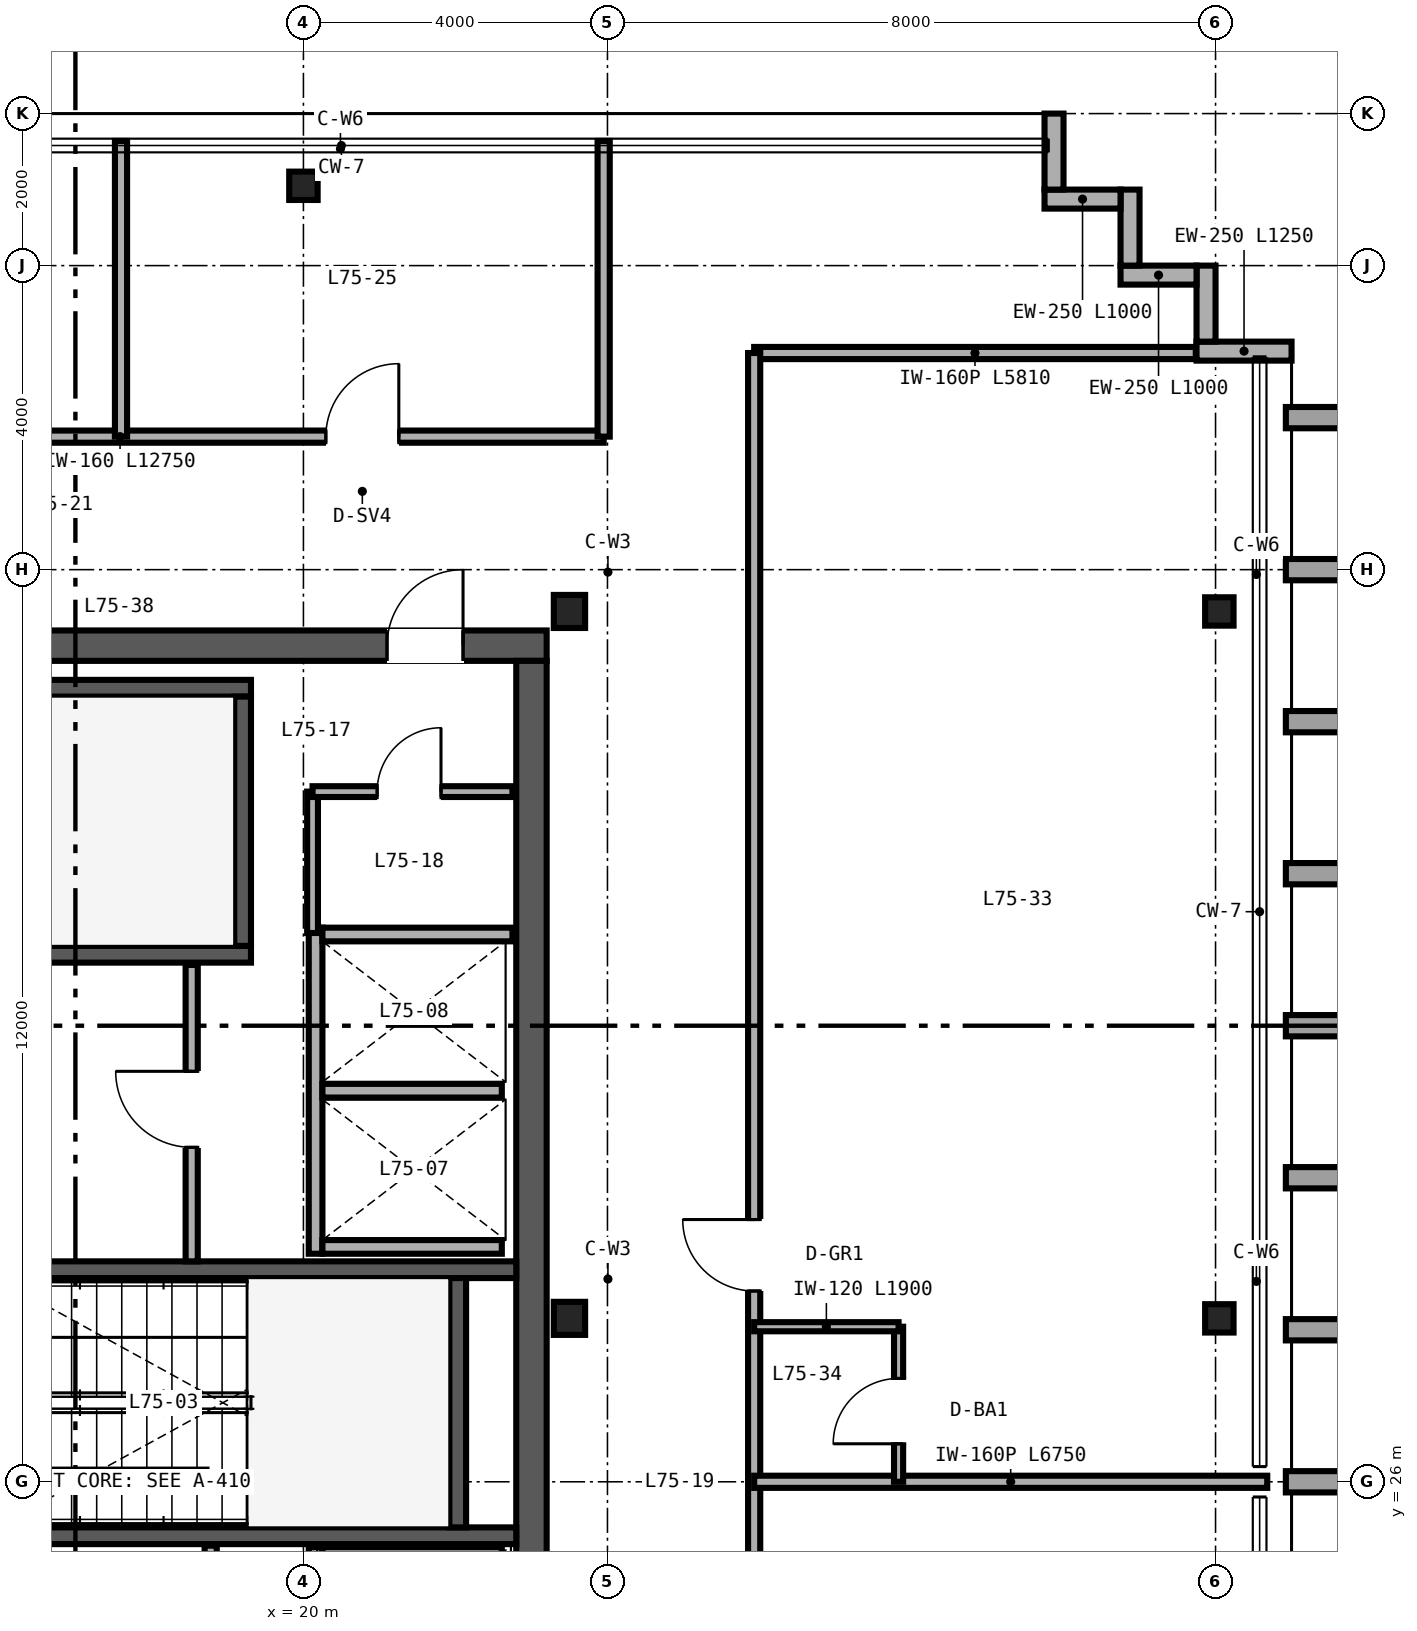
"""IFC4 building model, lengths in metres.
Left out: names, types, materials, properties, quantities, classifications, styles, units other than length and angle.
Written with IfcOpenShell. Run it as: python <this file> out.ifc"""

import sys

from ifc_helpers import new_model, si_unit, direction, frame, frame_2d, origin, origin_2d, place, context, subcontext, project, spatial, rectangle, i_section, extrude, source, transform, mapped, element, fill, save


model = new_model("IFC4")
c1 = context("Model", 3, precision=1e-05, world=origin(), true_north=direction((0.0, 1.0)))
c2 = subcontext(c1, "Body", "Model", "MODEL_VIEW")
j1 = project(units=[si_unit("LENGTHUNIT", "METRE"), si_unit("PLANEANGLEUNIT", "RADIAN")], contexts=[c1])
p1 = place(None, origin())
s1 = spatial("IfcSite", under=j1, at=p1, CompositionType="ELEMENT")
p2 = place(p1, origin())
s2 = spatial("IfcBuilding", under=s1, at=p2, CompositionType="ELEMENT")
p3 = place(p2, frame((0.0, 0.0, 294.0)))
s3 = spatial("IfcBuildingStorey", under=s2, at=p3, CompositionType="ELEMENT", Elevation=294.0)
p4 = place(p3, frame((10.8, 37.0, 0.0), z_axis=(0.0, 0.0, 1.0), x_axis=(1.0, 0.0, 0.0)))
e1 = element("IfcWall", 1, at=p4, inside=s3, PredefinedType="SHEAR", context=c2, shape_type="SweptSolid", body=[
    extrude(rectangle(XDim=12.4, YDim=0.4, at=frame_2d((6.2, 0.0))), origin(), (0.0, 0.0, 1.0), 3.38),
])
p5 = place(p4, frame((10.3, 0.0, 0.0)))
e2 = element("IfcOpeningElement", 2, at=p5, cuts=e1, PredefinedType="OPENING", context=c2, shape_type="SweptSolid", body=[
    extrude(rectangle(XDim=1.0, YDim=2.15, at=frame_2d((0.5, 1.075))), frame((0.0, 0.21, 0.0), z_axis=(0.0, -1.0, 0.0), x_axis=(1.0, 0.0, 0.0)), (0.0, 0.0, 1.0), 0.42),
])
p6 = place(p3, frame((23.0, 15.2, 0.0), z_axis=(0.0, 0.0, 1.0), x_axis=(0.0, 1.0, 0.0)))
e3 = element("IfcWall", 3, at=p6, inside=s3, PredefinedType="SHEAR", context=c2, shape_type="SweptSolid", body=[
    extrude(rectangle(XDim=21.6, YDim=0.4, at=frame_2d((10.8, 0.0))), origin(), (0.0, 0.0, 1.0), 3.38),
])
p7 = place(p3, frame((11.2, 32.94, 0.0), z_axis=(0.0, 0.0, 1.0), x_axis=(1.0, 0.0, 0.0)))
e4 = element("IfcWall", 4, at=p7, inside=s3, PredefinedType="SHEAR", context=c2, shape_type="SweptSolid", body=[
    extrude(rectangle(XDim=8.11, YDim=0.22, at=frame_2d((4.055, 0.0))), origin(), (0.0, 0.0, 1.0), 3.4),
])
p8 = place(p7, frame((0.72, 0.0, 0.0)))
e5 = element("IfcOpeningElement", 5, at=p8, cuts=e4, PredefinedType="OPENING", context=c2, shape_type="SweptSolid", body=[
    extrude(rectangle(XDim=1.05, YDim=2.15, at=frame_2d((0.525, 1.075))), frame((0.0, 0.12, 0.0), z_axis=(0.0, -1.0, 0.0), x_axis=(1.0, 0.0, 0.0)), (0.0, 0.0, 1.0), 0.24),
])
p9 = place(p3, frame((11.2, 36.44, 0.0), z_axis=(0.0, 0.0, 1.0), x_axis=(1.0, 0.0, 0.0)))
e6 = element("IfcWall", 6, at=p9, inside=s3, PredefinedType="SHEAR", context=c2, shape_type="SweptSolid", body=[
    extrude(rectangle(XDim=8.11, YDim=0.22, at=frame_2d((4.055, 0.0))), origin(), (0.0, 0.0, 1.0), 3.4),
])
p10 = place(p3, frame((19.2, 33.05, 0.0), z_axis=(0.0, 0.0, 1.0), x_axis=(0.0, 1.0, 0.0)))
e7 = element("IfcWall", 7, at=p10, inside=s3, PredefinedType="SHEAR", context=c2, shape_type="SweptSolid", body=[
    extrude(rectangle(XDim=3.28, YDim=0.22, at=frame_2d((1.64, 0.0))), origin(), (0.0, 0.0, 1.0), 3.4),
])
p11 = place(p3, frame((14.18, 25.29, 0.0), z_axis=(0.0, 0.0, 1.0), x_axis=(1.0, 0.0, 0.0)))
e8 = element("IfcWall", 8, at=p11, inside=s3, PredefinedType="SHEAR", context=c2, shape_type="SweptSolid", body=[
    extrude(rectangle(XDim=8.62, YDim=0.22, at=frame_2d((4.31, 0.0))), origin(), (0.0, 0.0, 1.0), 3.4),
])
p12 = place(p11, frame((0.47, 0.0, 0.0)))
e9 = element("IfcOpeningElement", 9, at=p12, cuts=e8, PredefinedType="OPENING", context=c2, shape_type="SweptSolid", body=[
    extrude(rectangle(XDim=1.05, YDim=2.15, at=frame_2d((0.525, 1.075))), frame((0.0, 0.12, 0.0), z_axis=(0.0, -1.0, 0.0), x_axis=(1.0, 0.0, 0.0)), (0.0, 0.0, 1.0), 0.24),
])
p13 = place(p3, frame((14.18, 28.79, 0.0), z_axis=(0.0, 0.0, 1.0), x_axis=(1.0, 0.0, 0.0)))
e10 = element("IfcWall", 10, at=p13, inside=s3, PredefinedType="SHEAR", context=c2, shape_type="SweptSolid", body=[
    extrude(rectangle(XDim=8.62, YDim=0.22, at=frame_2d((4.31, 0.0))), origin(), (0.0, 0.0, 1.0), 3.4),
])
p14 = place(p3, frame((22.03, 25.4, 0.0), z_axis=(0.0, 0.0, 1.0), x_axis=(0.0, 1.0, 0.0)))
e11 = element("IfcWall", 11, at=p14, inside=s3, PredefinedType="SHEAR", context=c2, shape_type="SweptSolid", body=[
    extrude(rectangle(XDim=3.28, YDim=0.22, at=frame_2d((1.64, 0.0))), origin(), (0.0, 0.0, 1.0), 3.4),
])
m1 = source(origin(), c2, "Body", "SweptSolid", [
    extrude(i_section(OverallWidth=0.412, OverallDepth=0.435, WebThickness=0.036, FlangeThickness=0.057, FilletRadius=0.025, at=origin_2d()), origin(), (0.0, 0.0, 1.0), 3.38),
])
for number, where, z_axis, x_axis in (
    (12, (23.5, 28.15, 0.0), (0.0, 0.0, 1.0), (1.0, 0.0, 0.0)),
    (13, (23.5, 37.45, 0.0), (0.0, 0.0, 1.0), (1.0, 0.0, 0.0)),
):
    element("IfcColumn", number, at=place(p3, frame(where, z_axis=z_axis, x_axis=x_axis)), inside=s3, PredefinedType="COLUMN", context=c2, shape_type="MappedRepresentation", body=[
        mapped(m1, transform((0.0, 0.0, 0.0), scale=1.0)),
    ])
m2 = source(origin(), c2, "Body", "SweptSolid", [
    extrude(i_section(OverallWidth=0.374, OverallDepth=0.373, WebThickness=0.016, FlangeThickness=0.026, FilletRadius=0.025, at=origin_2d()), origin(), (0.0, 0.0, 1.0), 3.38),
])
for number, where, z_axis, x_axis in (
    (14, (20.0, 43.05, 0.0), (0.0, 0.0, 1.0), (1.0, 0.0, 0.0)),
    (15, (32.05, 28.15, 0.0), (0.0, 0.0, 1.0), (1.0, 0.0, 0.0)),
    (16, (32.05, 37.45, 0.0), (0.0, 0.0, 1.0), (1.0, 0.0, 0.0)),
):
    element("IfcColumn", number, at=place(p3, frame(where, z_axis=z_axis, x_axis=x_axis)), inside=s3, PredefinedType="COLUMN", context=c2, shape_type="MappedRepresentation", body=[
        mapped(m2, transform((0.0, 0.0, 0.0), scale=1.0)),
    ])
p15 = place(p3, frame((33.0, 40.875, 0.0), z_axis=(0.0, 0.0, 1.0), x_axis=(-1.0, 0.0, 0.0)))
e17 = element("IfcWall", 17, at=p15, inside=s3, PredefinedType="SOLIDWALL", context=c2, shape_type="SweptSolid", body=[
    extrude(rectangle(XDim=1.25, YDim=0.25, at=frame_2d((0.625, 0.0))), origin(), (0.0, 0.0, 1.0), 3.38),
])
for number, where, z_axis, x_axis in (
    (18, (31.875, 41.0, 0.0), (0.0, 0.0, 1.0), (0.0, 1.0, 0.0)),
    (19, (31.75, 41.875, 0.0), (0.0, 0.0, 1.0), (-1.0, 0.0, 0.0)),
    (20, (30.875, 42.0, 0.0), (0.0, 0.0, 1.0), (0.0, 1.0, 0.0)),
    (21, (30.75, 42.875, 0.0), (0.0, 0.0, 1.0), (-1.0, 0.0, 0.0)),
    (22, (29.875, 43.0, 0.0), (0.0, 0.0, 1.0), (0.0, 1.0, 0.0)),
):
    element("IfcWall", number, at=place(p3, frame(where, z_axis=z_axis, x_axis=x_axis)), inside=s3, PredefinedType="SOLIDWALL", context=c2, shape_type="SweptSolid", body=[
        extrude(rectangle(XDim=1.0, YDim=0.25, at=frame_2d((0.5, 0.0))), origin(), (0.0, 0.0, 1.0), 3.38),
    ])
p16 = place(p3, frame((20.16, 18.82, 0.0), z_axis=(0.0, 0.0, 1.0), x_axis=(0.0, 1.0, 0.0)))
e23 = element("IfcWall", 23, at=p16, inside=s3, PredefinedType="SOLIDWALL", context=c2, shape_type="SweptSolid", body=[
    extrude(rectangle(XDim=6.32, YDim=0.18, at=frame_2d((3.16, 0.0))), origin(), (0.0, 0.0, 1.0), 2.48),
])
p17 = place(p16, frame((0.555, 0.0, 0.0)))
e24 = element("IfcOpeningElement", 24, at=p17, cuts=e23, PredefinedType="OPENING", context=c2, shape_type="SweptSolid", body=[
    extrude(rectangle(XDim=1.1, YDim=2.2, at=frame_2d((0.55, 1.1))), frame((0.0, 0.1, 0.0), z_axis=(0.0, -1.0, 0.0), x_axis=(1.0, 0.0, 0.0)), (0.0, 0.0, 1.0), 0.2),
])
p18 = place(p16, frame((2.635, 0.0, 0.0)))
e25 = element("IfcOpeningElement", 25, at=p18, cuts=e23, PredefinedType="OPENING", context=c2, shape_type="SweptSolid", body=[
    extrude(rectangle(XDim=1.1, YDim=2.2, at=frame_2d((0.55, 1.1))), frame((0.0, 0.1, 0.0), z_axis=(0.0, -1.0, 0.0), x_axis=(1.0, 0.0, 0.0)), (0.0, 0.0, 1.0), 0.2),
])
p19 = place(p16, frame((4.69, 0.0, 0.0)))
e26 = element("IfcOpeningElement", 26, at=p19, cuts=e23, PredefinedType="OPENING", context=c2, shape_type="SweptSolid", body=[
    extrude(rectangle(XDim=1.1, YDim=2.2, at=frame_2d((0.55, 1.1))), frame((0.0, 0.1, 0.0), z_axis=(0.0, -1.0, 0.0), x_axis=(1.0, 0.0, 0.0)), (0.0, 0.0, 1.0), 0.2),
])
p20 = place(p3, frame((20.25, 25.05, 0.0), z_axis=(0.0, 0.0, 1.0), x_axis=(1.0, 0.0, 0.0)))
e27 = element("IfcWall", 27, at=p20, inside=s3, PredefinedType="SOLIDWALL", context=c2, shape_type="SweptSolid", body=[
    extrude(rectangle(XDim=2.36, YDim=0.18, at=frame_2d((1.18, 0.0))), origin(), (0.0, 0.0, 1.0), 3.38),
])
p21 = place(p3, frame((20.16, 29.0, 0.0), z_axis=(0.0, 0.0, 1.0), x_axis=(0.0, 1.0, 0.0)))
e28 = element("IfcWall", 28, at=p21, inside=s3, PredefinedType="SOLIDWALL", context=c2, shape_type="SweptSolid", body=[
    extrude(rectangle(XDim=4.29, YDim=0.18, at=frame_2d((2.145, 0.0))), origin(), (0.0, 0.0, 1.0), 3.38),
])
p22 = place(p3, frame((20.25, 29.09, 0.0), z_axis=(0.0, 0.0, 1.0), x_axis=(1.0, 0.0, 0.0)))
e29 = element("IfcWall", 29, at=p22, inside=s3, PredefinedType="SOLIDWALL", context=c2, shape_type="SweptSolid", body=[
    extrude(rectangle(XDim=2.36, YDim=0.18, at=frame_2d((1.18, 0.0))), origin(), (0.0, 0.0, 1.0), 3.38),
])
p23 = place(p3, frame((20.25, 33.2, 0.0), z_axis=(0.0, 0.0, 1.0), x_axis=(1.0, 0.0, 0.0)))
e30 = element("IfcWall", 30, at=p23, inside=s3, PredefinedType="SOLIDWALL", context=c2, shape_type="SweptSolid", body=[
    extrude(rectangle(XDim=2.5, YDim=0.18, at=frame_2d((1.25, 0.0))), origin(), (0.0, 0.0, 1.0), 3.38),
])
p24 = place(p3, frame((20.25, 31.145, 0.0), z_axis=(0.0, 0.0, 1.0), x_axis=(1.0, 0.0, 0.0)))
e31 = element("IfcWall", 31, at=p24, inside=s3, PredefinedType="SOLIDWALL", context=c2, shape_type="SweptSolid", body=[
    extrude(rectangle(XDim=2.36, YDim=0.18, at=frame_2d((1.18, 0.0))), origin(), (0.0, 0.0, 1.0), 3.38),
])
p25 = place(p3, frame((18.78, 21.35, 0.0), z_axis=(0.0, 0.0, 1.0), x_axis=(0.0, 1.0, 0.0)))
e32 = element("IfcWall", 32, at=p25, inside=s3, PredefinedType="PARTITIONING", context=c2, shape_type="SweptSolid", body=[
    extrude(rectangle(XDim=3.81, YDim=0.16, at=frame_2d((1.905, 0.0))), origin(), (0.0, 0.0, 1.0), 3.38),
])
p26 = place(p3, frame((18.53, 28.9, 0.0), z_axis=(0.0, 0.0, 1.0), x_axis=(0.0, 1.0, 0.0)))
e33 = element("IfcWall", 33, at=p26, inside=s3, PredefinedType="PARTITIONING", context=c2, shape_type="SweptSolid", body=[
    extrude(rectangle(XDim=3.9, YDim=0.16, at=frame_2d((1.95, 0.0))), origin(), (0.0, 0.0, 1.0), 3.38),
])
p27 = place(p26, frame((1.5, 0.0, 0.0)))
e34 = element("IfcOpeningElement", 34, at=p27, cuts=e33, PredefinedType="OPENING", context=c2, shape_type="SweptSolid", body=[
    extrude(rectangle(XDim=1.0, YDim=2.15, at=frame_2d((0.5, 1.075))), frame((0.0, 0.09, 0.0), z_axis=(0.0, -1.0, 0.0), x_axis=(1.0, 0.0, 0.0)), (0.0, 0.0, 1.0), 0.18),
])
p28 = place(p3, frame((20.12, 33.22, 0.0), z_axis=(0.0, 0.0, 1.0), x_axis=(0.0, 1.0, 0.0)))
e35 = element("IfcWall", 35, at=p28, inside=s3, PredefinedType="PARTITIONING", context=c2, shape_type="SweptSolid", body=[
    extrude(rectangle(XDim=1.86, YDim=0.142, at=frame_2d((0.93, 0.0))), origin(), (0.0, 0.0, 1.0), 3.38),
])
p29 = place(p3, frame((20.12, 35.08, 0.0), z_axis=(0.0, 0.0, 1.0), x_axis=(1.0, 0.0, 0.0)))
e36 = element("IfcWall", 36, at=p29, inside=s3, PredefinedType="PARTITIONING", context=c2, shape_type="SweptSolid", body=[
    extrude(rectangle(XDim=2.63, YDim=0.142, at=frame_2d((1.315, 0.0))), origin(), (0.0, 0.0, 1.0), 3.38),
])
p30 = place(p29, frame((0.85, 0.0, 0.0)))
e37 = element("IfcOpeningElement", 37, at=p30, cuts=e36, PredefinedType="OPENING", context=c2, shape_type="SweptSolid", body=[
    extrude(rectangle(XDim=0.84, YDim=2.1, at=frame_2d((0.42, 1.05))), frame((0.0, 0.081, 0.0), z_axis=(0.0, -1.0, 0.0), x_axis=(1.0, 0.0, 0.0)), (0.0, 0.0, 1.0), 0.162),
])
p31 = place(p3, frame((11.2, 39.75, 0.0), z_axis=(0.0, 0.0, 1.0), x_axis=(1.0, 0.0, 0.0)))
e38 = element("IfcWall", 38, at=p31, inside=s3, PredefinedType="PARTITIONING", context=c2, shape_type="SweptSolid", body=[
    extrude(rectangle(XDim=12.75, YDim=0.16, at=frame_2d((6.375, 0.0))), origin(), (0.0, 0.0, 1.0), 3.38),
])
p32 = place(p31, frame((2.72, 0.0, 0.0)))
e39 = element("IfcOpeningElement", 39, at=p32, cuts=e38, PredefinedType="OPENING", context=c2, shape_type="SweptSolid", body=[
    extrude(rectangle(XDim=0.96, YDim=2.15, at=frame_2d((0.48, 1.075))), frame((0.0, 0.09, 0.0), z_axis=(0.0, -1.0, 0.0), x_axis=(1.0, 0.0, 0.0)), (0.0, 0.0, 1.0), 0.18),
])
p33 = place(p31, frame((9.095, 0.0, 0.0)))
e40 = element("IfcOpeningElement", 40, at=p33, cuts=e38, PredefinedType="OPENING", context=c2, shape_type="SweptSolid", body=[
    extrude(rectangle(XDim=0.96, YDim=2.15, at=frame_2d((0.48, 1.075))), frame((0.0, 0.09, 0.0), z_axis=(0.0, -1.0, 0.0), x_axis=(1.0, 0.0, 0.0)), (0.0, 0.0, 1.0), 0.18),
])
p34 = place(p3, frame((23.95, 39.75, 0.0), z_axis=(0.0, 0.0, 1.0), x_axis=(0.0, 1.0, 0.0)))
e41 = element("IfcWall", 41, at=p34, inside=s3, PredefinedType="PARTITIONING", context=c2, shape_type="SweptSolid", body=[
    extrude(rectangle(XDim=3.89, YDim=0.16, at=frame_2d((1.945, 0.0))), origin(), (0.0, 0.0, 1.0), 3.38),
])
p35 = place(p3, frame((17.6, 39.75, 0.0), z_axis=(0.0, 0.0, 1.0), x_axis=(0.0, 1.0, 0.0)))
e42 = element("IfcWall", 42, at=p35, inside=s3, PredefinedType="PARTITIONING", context=c2, shape_type="SweptSolid", body=[
    extrude(rectangle(XDim=3.89, YDim=0.16, at=frame_2d((1.945, 0.0))), origin(), (0.0, 0.0, 1.0), 2.687),
])
p36 = place(p3, frame((25.93, 40.85, 0.0), z_axis=(0.0, 0.0, 1.0), x_axis=(1.0, 0.0, 0.0)))
e43 = element("IfcWall", 43, at=p36, inside=s3, PredefinedType="PARTITIONING", context=c2, shape_type="SweptSolid", body=[
    extrude(rectangle(XDim=5.81, YDim=0.16, at=frame_2d((2.905, 0.0))), origin(), (0.0, 0.0, 1.0), 3.38),
])
p37 = place(p3, frame((25.93, 11.15, 0.0), z_axis=(0.0, 0.0, 1.0), x_axis=(0.0, 1.0, 0.0)))
e44 = element("IfcWall", 44, at=p37, inside=s3, PredefinedType="PARTITIONING", context=c2, shape_type="SweptSolid", body=[
    extrude(rectangle(XDim=29.7, YDim=0.16, at=frame_2d((14.85, 0.0))), origin(), (0.0, 0.0, 1.0), 2.524),
])
p38 = place(p37, frame((2.51, 0.0, 0.0)))
e45 = element("IfcOpeningElement", 45, at=p38, cuts=e44, PredefinedType="OPENING", context=c2, shape_type="SweptSolid", body=[
    extrude(rectangle(XDim=0.94, YDim=2.15, at=frame_2d((0.47, 1.075))), frame((0.0, 0.09, 0.0), z_axis=(0.0, -1.0, 0.0), x_axis=(1.0, 0.0, 0.0)), (0.0, 0.0, 1.0), 0.18),
])
p39 = place(p37, frame((17.36, 0.0, 0.0)))
e46 = element("IfcOpeningElement", 46, at=p39, cuts=e44, PredefinedType="OPENING", context=c2, shape_type="SweptSolid", body=[
    extrude(rectangle(XDim=0.94, YDim=2.15, at=frame_2d((0.47, 1.075))), frame((0.0, 0.09, 0.0), z_axis=(0.0, -1.0, 0.0), x_axis=(1.0, 0.0, 0.0)), (0.0, 0.0, 1.0), 0.18),
])
p40 = place(p3, frame((25.93, 26.0, 0.0), z_axis=(0.0, 0.0, 1.0), x_axis=(1.0, 0.0, 0.0)))
e47 = element("IfcWall", 47, at=p40, inside=s3, PredefinedType="PARTITIONING", context=c2, shape_type="SweptSolid", body=[
    extrude(rectangle(XDim=6.75, YDim=0.16, at=frame_2d((3.375, 0.0))), origin(), (0.0, 0.0, 1.0), 2.601),
])
p41 = place(p3, frame((27.83, 26.0, 0.0), z_axis=(0.0, 0.0, 1.0), x_axis=(0.0, 1.0, 0.0)))
e48 = element("IfcWall", 48, at=p41, inside=s3, PredefinedType="PARTITIONING", context=c2, shape_type="SweptSolid", body=[
    extrude(rectangle(XDim=2.04, YDim=0.12, at=frame_2d((1.02, 0.0))), origin(), (0.0, 0.0, 1.0), 2.524),
])
p42 = place(p41, frame((0.5, 0.0, 0.0)))
e49 = element("IfcOpeningElement", 49, at=p42, cuts=e48, PredefinedType="OPENING", context=c2, shape_type="SweptSolid", body=[
    extrude(rectangle(XDim=0.86, YDim=2.1, at=frame_2d((0.43, 1.05))), frame((0.0, 0.07, 0.0), z_axis=(0.0, -1.0, 0.0), x_axis=(1.0, 0.0, 0.0)), (0.0, 0.0, 1.0), 0.14),
])
p43 = place(p3, frame((25.93, 28.04, 0.0), z_axis=(0.0, 0.0, 1.0), x_axis=(1.0, 0.0, 0.0)))
e50 = element("IfcWall", 50, at=p43, inside=s3, PredefinedType="PARTITIONING", context=c2, shape_type="SweptSolid", body=[
    extrude(rectangle(XDim=1.9, YDim=0.12, at=frame_2d((0.95, 0.0))), origin(), (0.0, 0.0, 1.0), 2.524),
])
m3 = source(origin(), c2, "Body", "SweptSolid", [
    extrude(rectangle(XDim=1.0, YDim=2.15, at=frame_2d((0.5, 1.075))), frame((0.0, 0.025, 0.0), z_axis=(0.0, -1.0, 0.0), x_axis=(1.0, 0.0, 0.0)), (0.0, 0.0, 1.0), 0.05),
])
p44 = place(p27, origin())
e51 = element("IfcDoor", 51, at=p44, inside=s3, OperationType="SINGLE_SWING_RIGHT", PredefinedType="DOOR", context=c2, shape_type="MappedRepresentation", body=[
    mapped(m3, transform((0.0, 0.0, 0.0), scale=1.0)),
])
fill(e34, e51)
m4 = source(origin(), c2, "Body", "SweptSolid", [
    extrude(rectangle(XDim=0.84, YDim=2.1, at=frame_2d((0.42, 1.05))), frame((0.0, 0.025, 0.0), z_axis=(0.0, -1.0, 0.0), x_axis=(1.0, 0.0, 0.0)), (0.0, 0.0, 1.0), 0.05),
])
p45 = place(p30, origin())
e52 = element("IfcDoor", 52, at=p45, inside=s3, OperationType="SINGLE_SWING_RIGHT", PredefinedType="DOOR", context=c2, shape_type="MappedRepresentation", body=[
    mapped(m4, transform((0.0, 0.0, 0.0), scale=1.0)),
])
fill(e37, e52)
p46 = place(p5, origin())
e53 = element("IfcDoor", 53, at=p46, inside=s3, OperationType="SINGLE_SWING_RIGHT", PredefinedType="DOOR", context=c2, shape_type="MappedRepresentation", body=[
    mapped(m3, transform((0.0, 0.0, 0.0), scale=1.0)),
])
fill(e2, e53)
m5 = source(origin(), c2, "Body", "SweptSolid", [
    extrude(rectangle(XDim=0.96, YDim=2.15, at=frame_2d((0.48, 1.075))), frame((0.0, 0.025, 0.0), z_axis=(0.0, -1.0, 0.0), x_axis=(1.0, 0.0, 0.0)), (0.0, 0.0, 1.0), 0.05),
])
p47 = place(p33, origin())
e54 = element("IfcDoor", 54, at=p47, inside=s3, OperationType="SINGLE_SWING_RIGHT", PredefinedType="DOOR", context=c2, shape_type="MappedRepresentation", body=[
    mapped(m5, transform((0.0, 0.0, 0.0), scale=1.0)),
])
fill(e40, e54)
m6 = source(origin(), c2, "Body", "SweptSolid", [
    extrude(rectangle(XDim=0.86, YDim=2.1, at=frame_2d((0.43, 1.05))), frame((0.0, 0.025, 0.0), z_axis=(0.0, -1.0, 0.0), x_axis=(1.0, 0.0, 0.0)), (0.0, 0.0, 1.0), 0.05),
])
p48 = place(p42, origin())
e55 = element("IfcDoor", 55, at=p48, inside=s3, OperationType="SINGLE_SWING_LEFT", PredefinedType="DOOR", context=c2, shape_type="MappedRepresentation", body=[
    mapped(m6, transform((0.0, 0.0, 0.0), scale=1.0)),
])
fill(e49, e55)
m7 = source(origin(), c2, "Body", "SweptSolid", [
    extrude(rectangle(XDim=0.94, YDim=2.15, at=frame_2d((0.47, 1.075))), frame((0.0, 0.025, 0.0), z_axis=(0.0, -1.0, 0.0), x_axis=(1.0, 0.0, 0.0)), (0.0, 0.0, 1.0), 0.05),
])
p49 = place(p39, origin())
e56 = element("IfcDoor", 56, at=p49, inside=s3, OperationType="SINGLE_SWING_RIGHT", PredefinedType="DOOR", context=c2, shape_type="MappedRepresentation", body=[
    mapped(m7, transform((0.0, 0.0, 0.0), scale=1.0)),
])
fill(e46, e56)
save(model, sys.argv[1])
